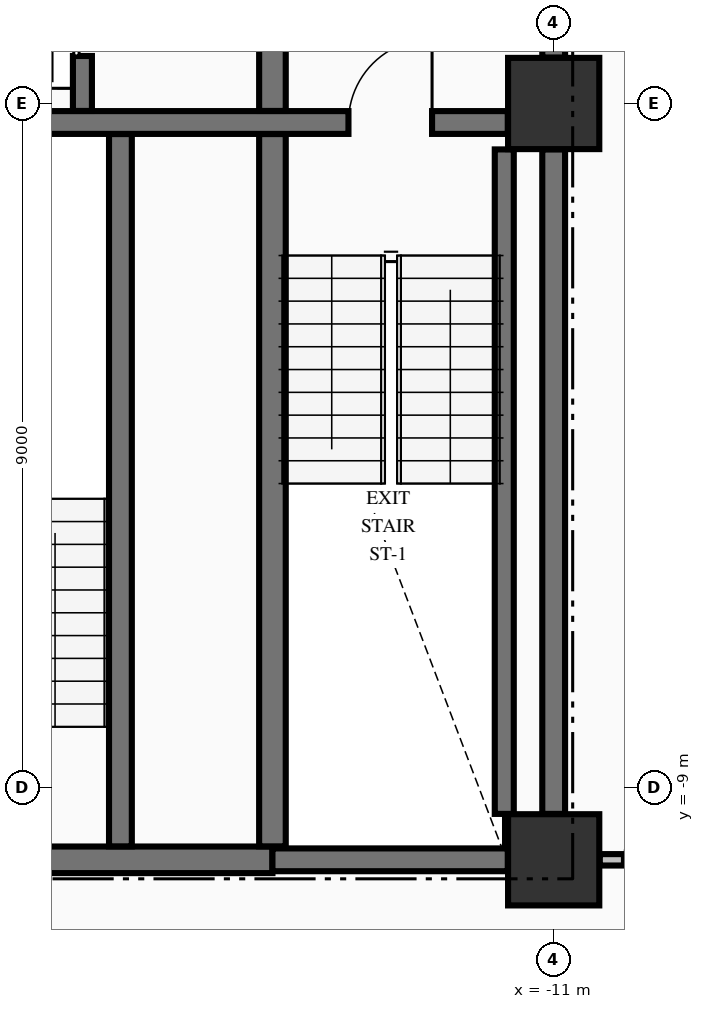
"""IFC4 building model, lengths in metres.
Left out: names, types, materials, properties, quantities, classifications, styles, units other than length and angle.
Written with IfcOpenShell. Run it as: python <this file> out.ifc"""

import sys

from ifc_helpers import new_model, si_unit, direction, frame, frame_2d, origin, origin_2d, place, context, subcontext, project, spatial, rectangle, extrude, element, fill, save


model = new_model("IFC4")
c1 = context("Model", 3, precision=1e-05, world=origin(), true_north=direction((0.0, 1.0)))
c2 = subcontext(c1, "Body", "Model", "MODEL_VIEW")
j1 = project(units=[si_unit("LENGTHUNIT", "METRE"), si_unit("PLANEANGLEUNIT", "RADIAN")], contexts=[c1])
p1 = place(None, origin())
s1 = spatial("IfcSite", under=j1, at=p1, CompositionType="ELEMENT")
p2 = place(p1, origin())
s2 = spatial("IfcBuilding", under=s1, at=p2, CompositionType="ELEMENT")
p3 = place(p2, frame((0.0, 0.0, 78.61)))
s3 = spatial("IfcBuildingStorey", under=s2, at=p3, CompositionType="ELEMENT", Elevation=78.61)
for number, where, z_axis, x_axis in (
    (1, (-11.0, -9.95, -0.25), (0.0, 0.0, 1.0), (1.0, 0.0, 0.0)),
    (2, (-11.0, 0.0, -0.25), (0.0, 0.0, 1.0), (1.0, 0.0, 0.0)),
):
    element("IfcColumn", number, at=place(p3, frame(where, z_axis=z_axis, x_axis=x_axis)), inside=s3, PredefinedType="COLUMN", context=c2, shape_type="SweptSolid", body=[
        extrude(rectangle(XDim=1.2, YDim=1.2, at=origin_2d()), origin(), (0.0, 0.0, 1.0), 3.395),
    ])
p4 = place(p3, frame((-19.396, -9.95, 0.0), z_axis=(0.0, 0.0, 1.0), x_axis=(1.0, 0.0, 0.0)))
e3 = element("IfcWall", 3, at=p4, inside=s3, PredefinedType="SHEAR", context=c2, shape_type="SweptSolid", body=[
    extrude(rectangle(XDim=4.696, YDim=0.35, at=frame_2d((2.348, 0.0))), origin(), (0.0, 0.0, 1.0), 3.145),
])
p5 = place(p4, frame((0.571, 0.0, 0.0)))
e4 = element("IfcOpeningElement", 4, at=p5, cuts=e3, PredefinedType="OPENING", context=c2, shape_type="SweptSolid", body=[
    extrude(rectangle(XDim=1.05, YDim=2.15, at=frame_2d((0.525, 1.075))), frame((0.0, 0.185, 0.0), z_axis=(0.0, -1.0, 0.0), x_axis=(1.0, 0.0, 0.0)), (0.0, 0.0, 1.0), 0.37),
])
p6 = place(p3, frame((-14.7, -9.95, 0.0), z_axis=(0.0, 0.0, 1.0), x_axis=(1.0, 0.0, 0.0)))
e5 = element("IfcWall", 5, at=p6, inside=s3, PredefinedType="SHEAR", context=c2, shape_type="SweptSolid", body=[
    extrude(rectangle(XDim=3.096, YDim=0.3, at=frame_2d((1.548, 0.0))), origin(), (0.0, 0.0, 1.0), 3.145),
])
p7 = place(p3, frame((-19.396, -0.25, 0.0), z_axis=(0.0, 0.0, 1.0), x_axis=(1.0, 0.0, 0.0)))
e6 = element("IfcWall", 6, at=p7, inside=s3, PredefinedType="SHEAR", context=c2, shape_type="SweptSolid", body=[
    extrude(rectangle(XDim=7.792, YDim=0.3, at=frame_2d((3.896, 0.0))), origin(), (0.0, 0.0, 1.0), 3.145),
])
p8 = place(p7, frame((5.696, 0.0, 0.0)))
e7 = element("IfcOpeningElement", 7, at=p8, cuts=e6, PredefinedType="OPENING", context=c2, shape_type="SweptSolid", body=[
    extrude(rectangle(XDim=1.1, YDim=2.15, at=frame_2d((0.55, 1.075))), frame((0.0, 0.16, 0.0), z_axis=(0.0, -1.0, 0.0), x_axis=(1.0, 0.0, 0.0)), (0.0, 0.0, 1.0), 0.32),
])
p9 = place(p3, frame((-10.394, -9.95, 0.0), z_axis=(0.0, 0.0, 1.0), x_axis=(1.0, 0.0, 0.0)))
e8 = element("IfcWall", 8, at=p9, inside=s3, PredefinedType="PARTITIONING", context=c2, shape_type="SweptSolid", body=[
    extrude(rectangle(XDim=20.788, YDim=0.15, at=frame_2d((10.394, 0.0))), origin(), (0.0, 0.0, 1.0), 3.145),
])
p10 = place(p9, frame((0.319, 0.0, 0.0)))
e9 = element("IfcOpeningElement", 9, at=p10, cuts=e8, PredefinedType="OPENING", context=c2, shape_type="SweptSolid", body=[
    extrude(rectangle(XDim=1.05, YDim=2.15, at=frame_2d((0.525, 1.075))), frame((0.0, 0.085, 0.0), z_axis=(0.0, -1.0, 0.0), x_axis=(1.0, 0.0, 0.0)), (0.0, 0.0, 1.0), 0.17),
])
p11 = place(p9, frame((19.419, 0.0, 0.0)))
e10 = element("IfcOpeningElement", 10, at=p11, cuts=e8, PredefinedType="OPENING", context=c2, shape_type="SweptSolid", body=[
    extrude(rectangle(XDim=1.05, YDim=2.15, at=frame_2d((0.525, 1.075))), frame((0.0, 0.085, 0.0), z_axis=(0.0, -1.0, 0.0), x_axis=(1.0, 0.0, 0.0)), (0.0, 0.0, 1.0), 0.17),
])
p12 = place(p9, frame((11.569, 0.0, 0.0)))
e11 = element("IfcOpeningElement", 11, at=p12, cuts=e8, PredefinedType="OPENING", context=c2, shape_type="SweptSolid", body=[
    extrude(rectangle(XDim=0.95, YDim=2.15, at=frame_2d((0.475, 1.075))), frame((0.0, 0.085, 0.0), z_axis=(0.0, -1.0, 0.0), x_axis=(1.0, 0.0, 0.0)), (0.0, 0.0, 1.0), 0.17),
])
p13 = place(p3, frame((-17.2, -0.098, 0.0), z_axis=(0.0, 0.0, 1.0), x_axis=(0.0, 1.0, 0.0)))
e12 = element("IfcWall", 12, at=p13, inside=s3, PredefinedType="SOLIDWALL", context=c2, shape_type="SweptSolid", body=[
    extrude(rectangle(XDim=2.571, YDim=0.25, at=frame_2d((1.285, 0.0))), origin(), (0.0, 0.0, 1.0), 3.145),
])
p14 = place(p13, frame((0.723, 0.0, 0.0)))
e13 = element("IfcOpeningElement", 13, at=p14, cuts=e12, PredefinedType="OPENING", context=c2, shape_type="SweptSolid", body=[
    extrude(rectangle(XDim=1.1, YDim=2.2, at=frame_2d((0.55, 1.1))), frame((0.0, 0.135, 0.0), z_axis=(0.0, -1.0, 0.0), x_axis=(1.0, 0.0, 0.0)), (0.0, 0.0, 1.0), 0.27),
])
p15 = place(p3, frame((-16.7, -9.773, 0.0), z_axis=(0.0, 0.0, 1.0), x_axis=(0.0, 1.0, 0.0)))
e14 = element("IfcWall", 14, at=p15, inside=s3, PredefinedType="SHEAR", context=c2, shape_type="SweptSolid", body=[
    extrude(rectangle(XDim=9.371, YDim=0.3, at=frame_2d((4.686, 0.0))), origin(), (0.0, 0.0, 1.0), 3.145),
])
p16 = place(p3, frame((-14.7, -9.773, 0.0), z_axis=(0.0, 0.0, 1.0), x_axis=(0.0, 1.0, 0.0)))
e15 = element("IfcWall", 15, at=p16, inside=s3, PredefinedType="SHEAR", context=c2, shape_type="SweptSolid", body=[
    extrude(rectangle(XDim=9.371, YDim=0.35, at=frame_2d((4.686, 0.0))), origin(), (0.0, 0.0, 1.0), 3.145),
])
p17 = place(p3, frame((-14.7, -0.098, 0.0), z_axis=(0.0, 0.0, 1.0), x_axis=(0.0, 1.0, 0.0)))
e16 = element("IfcWall", 16, at=p17, inside=s3, PredefinedType="SHEAR", context=c2, shape_type="SweptSolid", body=[
    extrude(rectangle(XDim=2.846, YDim=0.35, at=frame_2d((1.423, 0.0))), origin(), (0.0, 0.0, 1.0), 3.145),
])
p18 = place(p3, frame((-11.65, -9.346, 0.0), z_axis=(0.0, 0.0, 1.0), x_axis=(0.0, 1.0, 0.0)))
e17 = element("IfcWall", 17, at=p18, inside=s3, PredefinedType="SOLIDWALL", context=c2, shape_type="SweptSolid", body=[
    extrude(rectangle(XDim=8.742, YDim=0.25, at=frame_2d((4.371, 0.0))), origin(), (0.0, 0.0, 1.0), 3.145),
])
p19 = place(p3, frame((-11.0, -9.346, 0.0), z_axis=(0.0, 0.0, 1.0), x_axis=(0.0, 1.0, 0.0)))
e18 = element("IfcWall", 18, at=p19, inside=s3, PredefinedType="SHEAR", context=c2, shape_type="SweptSolid", body=[
    extrude(rectangle(XDim=8.742, YDim=0.3, at=frame_2d((4.371, 0.0))), origin(), (0.0, 0.0, 1.0), 3.145),
])
p20 = place(p3, frame((-11.0, 0.604, 0.0), z_axis=(0.0, 0.0, 1.0), x_axis=(0.0, 1.0, 0.0)))
e19 = element("IfcWall", 19, at=p20, inside=s3, PredefinedType="SHEAR", context=c2, shape_type="SweptSolid", body=[
    extrude(rectangle(XDim=2.144, YDim=0.3, at=frame_2d((1.072, 0.0))), origin(), (0.0, 0.0, 1.0), 3.145),
])
p21 = place(p20, frame((0.496, 0.0, 0.0)))
e20 = element("IfcOpeningElement", 20, at=p21, cuts=e19, PredefinedType="OPENING", context=c2, shape_type="SweptSolid", body=[
    extrude(rectangle(XDim=1.1, YDim=2.15, at=frame_2d((0.55, 1.075))), frame((0.0, 0.16, 0.0), z_axis=(0.0, -1.0, 0.0), x_axis=(1.0, 0.0, 0.0)), (0.0, 0.0, 1.0), 0.32),
])
p22 = place(p8, origin())
e21 = element("IfcDoor", 21, at=p22, inside=s3, OperationType="SINGLE_SWING_RIGHT", PredefinedType="DOOR", context=c2, shape_type="SweptSolid", body=[
    extrude(rectangle(XDim=1.1, YDim=2.15, at=frame_2d((0.55, 1.075))), frame((0.0, 0.025, 0.0), z_axis=(0.0, -1.0, 0.0), x_axis=(1.0, 0.0, 0.0)), (0.0, 0.0, 1.0), 0.05),
])
fill(e7, e21)
p23 = place(p14, origin())
e22 = element("IfcDoor", 22, at=p23, inside=s3, OperationType="SLIDING_TO_LEFT", PredefinedType="DOOR", context=c2, shape_type="SweptSolid", body=[
    extrude(rectangle(XDim=1.1, YDim=2.2, at=frame_2d((0.55, 1.1))), frame((0.0, 0.025, 0.0), z_axis=(0.0, -1.0, 0.0), x_axis=(1.0, 0.0, 0.0)), (0.0, 0.0, 1.0), 0.05),
])
fill(e13, e22)
save(model, sys.argv[1])
